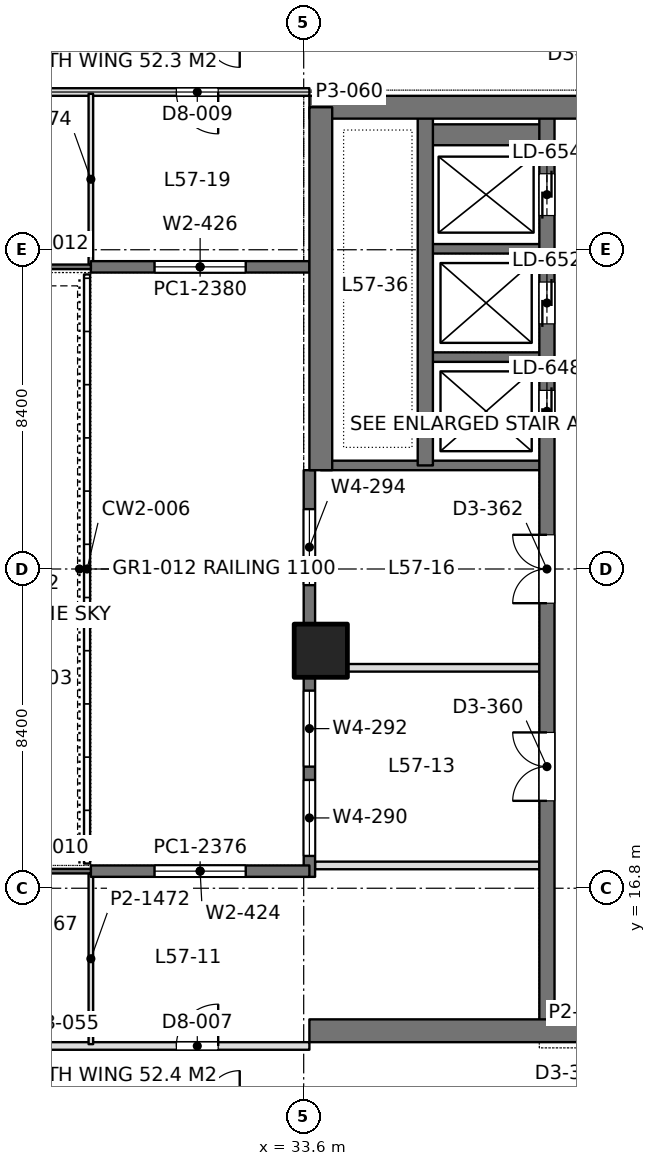
"""IFC4 building model, lengths in metres.
Left out: names, types, materials, properties, quantities, classifications, styles, units other than length and angle.
Written with IfcOpenShell. Run it as: python <this file> out.ifc"""

import sys

from ifc_helpers import new_model, si_unit, direction, frame, frame_2d, origin, origin_2d, place, context, subcontext, project, spatial, rectangle, extrude, element, fill, save


model = new_model("IFC4")
c1 = context("Model", 3, precision=1e-05, world=origin(), true_north=direction((0.0, 1.0)))
c2 = subcontext(c1, "Body", "Model", "MODEL_VIEW")
j1 = project(units=[si_unit("LENGTHUNIT", "METRE"), si_unit("PLANEANGLEUNIT", "RADIAN")], contexts=[c1])
p1 = place(None, origin())
s1 = spatial("IfcSite", under=j1, at=p1, CompositionType="ELEMENT")
p2 = place(p1, origin())
s2 = spatial("IfcBuilding", under=s1, at=p2, CompositionType="ELEMENT")
p3 = place(p2, frame((0.0, 0.0, 250.2)))
s3 = spatial("IfcBuildingStorey", under=s2, at=p3, CompositionType="ELEMENT", Elevation=250.2)
p4 = place(p3, frame((34.05, 23.05, 0.0), z_axis=(0.0, 0.0, 1.0), x_axis=(1.0, 0.0, 0.0)))
e1 = element("IfcColumn", 1, at=p4, inside=s3, PredefinedType="COLUMN", context=c2, shape_type="SweptSolid", body=[
    extrude(rectangle(XDim=1.4, YDim=1.4, at=origin_2d()), origin(), (0.0, 0.0, 1.0), 4.5),
])
p5 = place(p3, frame((33.75, 13.05, 0.0), z_axis=(0.0, 0.0, 1.0), x_axis=(1.0, 0.0, 0.0)))
e2 = element("IfcWall", 2, at=p5, inside=s3, PredefinedType="SHEAR", context=c2, shape_type="SweptSolid", body=[
    extrude(rectangle(XDim=17.7, YDim=0.6, at=frame_2d((8.85, 0.0))), origin(), (0.0, 0.0, 1.0), 4.5),
])
p6 = place(p5, frame((7.1, 0.0, 0.0)))
e3 = element("IfcOpeningElement", 3, at=p6, cuts=e2, PredefinedType="OPENING", context=c2, shape_type="SweptSolid", body=[
    extrude(rectangle(XDim=1.8, YDim=2.4, at=frame_2d((0.9, 1.2))), frame((0.0, 0.31, 0.0), z_axis=(0.0, -1.0, 0.0), x_axis=(1.0, 0.0, 0.0)), (0.0, 0.0, 1.0), 0.62),
])
p7 = place(p3, frame((33.75, 37.35, 0.0), z_axis=(0.0, 0.0, 1.0), x_axis=(1.0, 0.0, 0.0)))
e4 = element("IfcWall", 4, at=p7, inside=s3, PredefinedType="SHEAR", context=c2, shape_type="SweptSolid", body=[
    extrude(rectangle(XDim=17.7, YDim=0.6, at=frame_2d((8.85, 0.0))), origin(), (0.0, 0.0, 1.0), 4.5),
])
p8 = place(p7, frame((7.1, 0.0, 0.0)))
e5 = element("IfcOpeningElement", 5, at=p8, cuts=e4, PredefinedType="OPENING", context=c2, shape_type="SweptSolid", body=[
    extrude(rectangle(XDim=1.8, YDim=2.4, at=frame_2d((0.9, 1.2))), frame((0.0, 0.31, 0.0), z_axis=(0.0, -1.0, 0.0), x_axis=(1.0, 0.0, 0.0)), (0.0, 0.0, 1.0), 0.62),
])
p9 = place(p3, frame((34.05, 27.8, 0.0), z_axis=(0.0, 0.0, 1.0), x_axis=(0.0, 1.0, 0.0)))
e6 = element("IfcWall", 6, at=p9, inside=s3, PredefinedType="SHEAR", context=c2, shape_type="SweptSolid", body=[
    extrude(rectangle(XDim=9.55, YDim=0.6, at=frame_2d((4.775, 0.0))), origin(), (0.0, 0.0, 1.0), 4.5),
])
p10 = place(p3, frame((40.0, 13.05, 0.0), z_axis=(0.0, 0.0, 1.0), x_axis=(0.0, 1.0, 0.0)))
e7 = element("IfcWall", 7, at=p10, inside=s3, PredefinedType="SHEAR", context=c2, shape_type="SweptSolid", body=[
    extrude(rectangle(XDim=24.3, YDim=0.4, at=frame_2d((12.15, 0.0))), origin(), (0.0, 0.0, 1.0), 4.5),
])
p11 = place(p10, frame((15.75, 0.0, 0.0)))
e8 = element("IfcOpeningElement", 8, at=p11, cuts=e7, PredefinedType="OPENING", context=c2, shape_type="SweptSolid", body=[
    extrude(rectangle(XDim=1.1, YDim=2.2, at=frame_2d((0.55, 1.1))), frame((0.0, 0.21, 0.0), z_axis=(0.0, -1.0, 0.0), x_axis=(1.0, 0.0, 0.0)), (0.0, 0.0, 1.0), 0.42),
])
p12 = place(p10, frame((18.6, 0.0, 0.0)))
e9 = element("IfcOpeningElement", 9, at=p12, cuts=e7, PredefinedType="OPENING", context=c2, shape_type="SweptSolid", body=[
    extrude(rectangle(XDim=1.1, YDim=2.2, at=frame_2d((0.55, 1.1))), frame((0.0, 0.21, 0.0), z_axis=(0.0, -1.0, 0.0), x_axis=(1.0, 0.0, 0.0)), (0.0, 0.0, 1.0), 0.42),
])
p13 = place(p10, frame((21.45, 0.0, 0.0)))
e10 = element("IfcOpeningElement", 10, at=p13, cuts=e7, PredefinedType="OPENING", context=c2, shape_type="SweptSolid", body=[
    extrude(rectangle(XDim=1.1, YDim=2.2, at=frame_2d((0.55, 1.1))), frame((0.0, 0.21, 0.0), z_axis=(0.0, -1.0, 0.0), x_axis=(1.0, 0.0, 0.0)), (0.0, 0.0, 1.0), 0.42),
])
p14 = place(p10, frame((6.05, 0.0, 0.0)))
e11 = element("IfcOpeningElement", 11, at=p14, cuts=e7, PredefinedType="OPENING", context=c2, shape_type="SweptSolid", body=[
    extrude(rectangle(XDim=1.8, YDim=2.4, at=frame_2d((0.9, 1.2))), frame((0.0, 0.21, 0.0), z_axis=(0.0, -1.0, 0.0), x_axis=(1.0, 0.0, 0.0)), (0.0, 0.0, 1.0), 0.42),
])
p15 = place(p10, frame((11.25, 0.0, 0.0)))
e12 = element("IfcOpeningElement", 12, at=p15, cuts=e7, PredefinedType="OPENING", context=c2, shape_type="SweptSolid", body=[
    extrude(rectangle(XDim=1.8, YDim=2.4, at=frame_2d((0.9, 1.2))), frame((0.0, 0.21, 0.0), z_axis=(0.0, -1.0, 0.0), x_axis=(1.0, 0.0, 0.0)), (0.0, 0.0, 1.0), 0.42),
])
p16 = place(p3, frame((36.8, 27.925, 0.0), z_axis=(0.0, 0.0, 1.0), x_axis=(0.0, 1.0, 0.0)))
e13 = element("IfcWall", 13, at=p16, inside=s3, PredefinedType="SHEAR", context=c2, shape_type="SweptSolid", body=[
    extrude(rectangle(XDim=9.425, YDim=0.4, at=frame_2d((4.712, 0.0))), origin(), (0.0, 0.0, 1.0), 4.5),
])
p17 = place(p3, frame((40.0, 27.925, 0.0), z_axis=(0.0, 0.0, 1.0), x_axis=(-1.0, 0.0, 0.0)))
e14 = element("IfcWall", 14, at=p17, inside=s3, PredefinedType="SHEAR", context=c2, shape_type="SweptSolid", body=[
    extrude(rectangle(XDim=5.95, YDim=0.25, at=frame_2d((2.975, 0.0))), origin(), (0.0, 0.0, 1.0), 4.5),
])
for number, where, z_axis, x_axis in (
    (15, (40.0, 30.775, 0.0), (0.0, 0.0, 1.0), (-1.0, 0.0, 0.0)),
    (16, (40.0, 33.625, 0.0), (0.0, 0.0, 1.0), (-1.0, 0.0, 0.0)),
):
    element("IfcWall", number, at=place(p3, frame(where, z_axis=z_axis, x_axis=x_axis)), inside=s3, PredefinedType="SHEAR", context=c2, shape_type="SweptSolid", body=[
        extrude(rectangle(XDim=3.2, YDim=0.25, at=frame_2d((1.6, 0.0))), origin(), (0.0, 0.0, 1.0), 4.5),
    ])
p18 = place(p3, frame((40.0, 36.625, 0.0), z_axis=(0.0, 0.0, 1.0), x_axis=(-1.0, 0.0, 0.0)))
e17 = element("IfcWall", 17, at=p18, inside=s3, PredefinedType="SHEAR", context=c2, shape_type="SweptSolid", body=[
    extrude(rectangle(XDim=3.2, YDim=0.55, at=frame_2d((1.6, 0.0))), origin(), (0.0, 0.0, 1.0), 4.5),
])
p19 = place(p3, frame((33.75, 17.1, 0.0), z_axis=(0.0, 0.0, 1.0), x_axis=(0.0, 1.0, 0.0)))
e18 = element("IfcWall", 18, at=p19, inside=s3, PredefinedType="SOLIDWALL", context=c2, shape_type="SweptSolid", body=[
    extrude(rectangle(XDim=10.7, YDim=0.3, at=frame_2d((5.35, 0.0))), origin(), (0.0, 0.0, 1.0), 4.35),
])
p20 = place(p19, frame((0.55, 0.0, 0.9)))
e19 = element("IfcOpeningElement", 19, at=p20, cuts=e18, PredefinedType="OPENING", context=c2, shape_type="SweptSolid", body=[
    extrude(rectangle(XDim=2.0, YDim=1.9, at=frame_2d((1.0, 0.95))), frame((0.0, 0.16, 0.0), z_axis=(0.0, -1.0, 0.0), x_axis=(1.0, 0.0, 0.0)), (0.0, 0.0, 1.0), 0.32),
])
p21 = place(p19, frame((2.9, 0.0, 0.9)))
e20 = element("IfcOpeningElement", 20, at=p21, cuts=e18, PredefinedType="OPENING", context=c2, shape_type="SweptSolid", body=[
    extrude(rectangle(XDim=2.0, YDim=1.9, at=frame_2d((1.0, 0.95))), frame((0.0, 0.16, 0.0), z_axis=(0.0, -1.0, 0.0), x_axis=(1.0, 0.0, 0.0)), (0.0, 0.0, 1.0), 0.32),
])
p22 = place(p19, frame((7.675, 0.0, 0.9)))
e21 = element("IfcOpeningElement", 21, at=p22, cuts=e18, PredefinedType="OPENING", context=c2, shape_type="SweptSolid", body=[
    extrude(rectangle(XDim=2.0, YDim=1.9, at=frame_2d((1.0, 0.95))), frame((0.0, 0.16, 0.0), z_axis=(0.0, -1.0, 0.0), x_axis=(1.0, 0.0, 0.0)), (0.0, 0.0, 1.0), 0.32),
])
p23 = place(p3, frame((25.7, 17.25, 0.0), z_axis=(0.0, 0.0, 1.0), x_axis=(1.0, 0.0, 0.0)))
e22 = element("IfcWall", 22, at=p23, inside=s3, PredefinedType="SOLIDWALL", context=c2, shape_type="SweptSolid", body=[
    extrude(rectangle(XDim=2.3, YDim=0.12, at=frame_2d((1.15, 0.0))), origin(), (0.0, 0.0, 1.0), 4.35),
])
p24 = place(p3, frame((28.0, 17.25, 0.0), z_axis=(0.0, 0.0, 1.0), x_axis=(1.0, 0.0, 0.0)))
e23 = element("IfcWall", 23, at=p24, inside=s3, PredefinedType="SOLIDWALL", context=c2, shape_type="SweptSolid", body=[
    extrude(rectangle(XDim=5.75, YDim=0.3, at=frame_2d((2.875, 0.0))), origin(), (0.0, 0.0, 1.0), 4.35),
])
p25 = place(p24, frame((1.675, 0.0, 0.9)))
e24 = element("IfcOpeningElement", 24, at=p25, cuts=e23, PredefinedType="OPENING", context=c2, shape_type="SweptSolid", body=[
    extrude(rectangle(XDim=2.4, YDim=1.9, at=frame_2d((1.2, 0.95))), frame((0.0, 0.16, 0.0), z_axis=(0.0, -1.0, 0.0), x_axis=(1.0, 0.0, 0.0)), (0.0, 0.0, 1.0), 0.32),
])
p26 = place(p3, frame((25.7, 33.15, 0.0), z_axis=(0.0, 0.0, 1.0), x_axis=(1.0, 0.0, 0.0)))
e25 = element("IfcWall", 25, at=p26, inside=s3, PredefinedType="SOLIDWALL", context=c2, shape_type="SweptSolid", body=[
    extrude(rectangle(XDim=2.3, YDim=0.12, at=frame_2d((1.15, 0.0))), origin(), (0.0, 0.0, 1.0), 4.35),
])
p27 = place(p3, frame((28.0, 33.15, 0.0), z_axis=(0.0, 0.0, 1.0), x_axis=(1.0, 0.0, 0.0)))
e26 = element("IfcWall", 26, at=p27, inside=s3, PredefinedType="SOLIDWALL", context=c2, shape_type="SweptSolid", body=[
    extrude(rectangle(XDim=5.75, YDim=0.3, at=frame_2d((2.875, 0.0))), origin(), (0.0, 0.0, 1.0), 4.35),
])
p28 = place(p27, frame((1.675, 0.0, 0.9)))
e27 = element("IfcOpeningElement", 27, at=p28, cuts=e26, PredefinedType="OPENING", context=c2, shape_type="SweptSolid", body=[
    extrude(rectangle(XDim=2.4, YDim=1.9, at=frame_2d((1.2, 0.95))), frame((0.0, 0.16, 0.0), z_axis=(0.0, -1.0, 0.0), x_axis=(1.0, 0.0, 0.0)), (0.0, 0.0, 1.0), 0.32),
])
p29 = place(p3, frame((33.898, 17.4, 0.0), z_axis=(0.0, 0.0, 1.0), x_axis=(1.0, 0.0, 0.0)))
e28 = element("IfcWall", 28, at=p29, inside=s3, PredefinedType="PARTITIONING", context=c2, shape_type="SweptSolid", body=[
    extrude(rectangle(XDim=5.904, YDim=0.2, at=frame_2d((2.952, 0.0))), origin(), (0.0, 0.0, 1.0), 3.8),
])
p30 = place(p3, frame((34.749, 22.6, 0.0), z_axis=(0.0, 0.0, 1.0), x_axis=(1.0, 0.0, 0.0)))
e29 = element("IfcWall", 29, at=p30, inside=s3, PredefinedType="PARTITIONING", context=c2, shape_type="SweptSolid", body=[
    extrude(rectangle(XDim=5.053, YDim=0.2, at=frame_2d((2.526, 0.0))), origin(), (0.0, 0.0, 1.0), 4.35),
])
p31 = place(p3, frame((16.65, 12.65, 0.0), z_axis=(0.0, 0.0, 1.0), x_axis=(1.0, 0.0, 0.0)))
e30 = element("IfcWall", 30, at=p31, inside=s3, PredefinedType="PARTITIONING", context=c2, shape_type="SweptSolid", body=[
    extrude(rectangle(XDim=17.1, YDim=0.2, at=frame_2d((8.55, 0.0))), origin(), (0.0, 0.0, 1.0), 3.8),
])
p32 = place(p31, frame((2.4, 0.0, 0.0)))
e31 = element("IfcOpeningElement", 31, at=p32, cuts=e30, PredefinedType="OPENING", context=c2, shape_type="SweptSolid", body=[
    extrude(rectangle(XDim=1.1, YDim=2.4, at=frame_2d((0.55, 1.2))), frame((0.0, 0.11, 0.0), z_axis=(0.0, -1.0, 0.0), x_axis=(1.0, 0.0, 0.0)), (0.0, 0.0, 1.0), 0.22),
])
p33 = place(p31, frame((7.65, 0.0, 0.0)))
e32 = element("IfcOpeningElement", 32, at=p33, cuts=e30, PredefinedType="OPENING", context=c2, shape_type="SweptSolid", body=[
    extrude(rectangle(XDim=1.8, YDim=2.2, at=frame_2d((0.9, 1.1))), frame((0.0, 0.11, 0.0), z_axis=(0.0, -1.0, 0.0), x_axis=(1.0, 0.0, 0.0)), (0.0, 0.0, 1.0), 0.22),
])
p34 = place(p31, frame((13.6, 0.0, 0.0)))
e33 = element("IfcOpeningElement", 33, at=p34, cuts=e30, PredefinedType="OPENING", context=c2, shape_type="SweptSolid", body=[
    extrude(rectangle(XDim=1.1, YDim=2.4, at=frame_2d((0.55, 1.2))), frame((0.0, 0.11, 0.0), z_axis=(0.0, -1.0, 0.0), x_axis=(1.0, 0.0, 0.0)), (0.0, 0.0, 1.0), 0.22),
])
p35 = place(p3, frame((28.0, 12.698, 0.0), z_axis=(0.0, 0.0, 1.0), x_axis=(0.0, 1.0, 0.0)))
e34 = element("IfcWall", 34, at=p35, inside=s3, PredefinedType="PARTITIONING", context=c2, shape_type="SweptSolid", body=[
    extrude(rectangle(XDim=4.494, YDim=0.12, at=frame_2d((2.247, 0.0))), origin(), (0.0, 0.0, 1.0), 3.5),
])
p36 = place(p3, frame((16.65, 37.75, 0.0), z_axis=(0.0, 0.0, 1.0), x_axis=(1.0, 0.0, 0.0)))
e35 = element("IfcWall", 35, at=p36, inside=s3, PredefinedType="PARTITIONING", context=c2, shape_type="SweptSolid", body=[
    extrude(rectangle(XDim=17.1, YDim=0.2, at=frame_2d((8.55, 0.0))), origin(), (0.0, 0.0, 1.0), 3.8),
])
p37 = place(p36, frame((2.4, 0.0, 0.0)))
e36 = element("IfcOpeningElement", 36, at=p37, cuts=e35, PredefinedType="OPENING", context=c2, shape_type="SweptSolid", body=[
    extrude(rectangle(XDim=1.1, YDim=2.4, at=frame_2d((0.55, 1.2))), frame((0.0, 0.11, 0.0), z_axis=(0.0, -1.0, 0.0), x_axis=(1.0, 0.0, 0.0)), (0.0, 0.0, 1.0), 0.22),
])
p38 = place(p36, frame((7.65, 0.0, 0.0)))
e37 = element("IfcOpeningElement", 37, at=p38, cuts=e35, PredefinedType="OPENING", context=c2, shape_type="SweptSolid", body=[
    extrude(rectangle(XDim=1.8, YDim=2.2, at=frame_2d((0.9, 1.1))), frame((0.0, 0.11, 0.0), z_axis=(0.0, -1.0, 0.0), x_axis=(1.0, 0.0, 0.0)), (0.0, 0.0, 1.0), 0.22),
])
p39 = place(p36, frame((13.6, 0.0, 0.0)))
e38 = element("IfcOpeningElement", 38, at=p39, cuts=e35, PredefinedType="OPENING", context=c2, shape_type="SweptSolid", body=[
    extrude(rectangle(XDim=1.1, YDim=2.4, at=frame_2d((0.55, 1.2))), frame((0.0, 0.11, 0.0), z_axis=(0.0, -1.0, 0.0), x_axis=(1.0, 0.0, 0.0)), (0.0, 0.0, 1.0), 0.22),
])
p40 = place(p3, frame((28.0, 33.208, 0.0), z_axis=(0.0, 0.0, 1.0), x_axis=(0.0, 1.0, 0.0)))
e39 = element("IfcWall", 39, at=p40, inside=s3, PredefinedType="PARTITIONING", context=c2, shape_type="SweptSolid", body=[
    extrude(rectangle(XDim=4.494, YDim=0.12, at=frame_2d((2.247, 0.0))), origin(), (0.0, 0.0, 1.0), 3.5),
])
p41 = place(p20, origin())
e40 = element("IfcWindow", 40, at=p41, inside=s3, PartitioningType="SINGLE_PANEL", PredefinedType="WINDOW", context=c2, shape_type="SweptSolid", body=[
    extrude(rectangle(XDim=2.0, YDim=1.9, at=frame_2d((1.0, 0.95))), frame((0.0, 0.03, 0.0), z_axis=(0.0, -1.0, 0.0), x_axis=(1.0, 0.0, 0.0)), (0.0, 0.0, 1.0), 0.06),
])
fill(e19, e40)
p42 = place(p21, origin())
e41 = element("IfcWindow", 41, at=p42, inside=s3, PartitioningType="SINGLE_PANEL", PredefinedType="WINDOW", context=c2, shape_type="SweptSolid", body=[
    extrude(rectangle(XDim=2.0, YDim=1.9, at=frame_2d((1.0, 0.95))), frame((0.0, 0.03, 0.0), z_axis=(0.0, -1.0, 0.0), x_axis=(1.0, 0.0, 0.0)), (0.0, 0.0, 1.0), 0.06),
])
fill(e20, e41)
p43 = place(p22, origin())
e42 = element("IfcWindow", 42, at=p43, inside=s3, PartitioningType="SINGLE_PANEL", PredefinedType="WINDOW", context=c2, shape_type="SweptSolid", body=[
    extrude(rectangle(XDim=2.0, YDim=1.9, at=frame_2d((1.0, 0.95))), frame((0.0, 0.03, 0.0), z_axis=(0.0, -1.0, 0.0), x_axis=(1.0, 0.0, 0.0)), (0.0, 0.0, 1.0), 0.06),
])
fill(e21, e42)
p44 = place(p25, origin())
e43 = element("IfcWindow", 43, at=p44, inside=s3, PartitioningType="SINGLE_PANEL", PredefinedType="WINDOW", context=c2, shape_type="SweptSolid", body=[
    extrude(rectangle(XDim=2.4, YDim=1.9, at=frame_2d((1.2, 0.95))), frame((0.0, 0.03, 0.0), z_axis=(0.0, -1.0, 0.0), x_axis=(1.0, 0.0, 0.0)), (0.0, 0.0, 1.0), 0.06),
])
fill(e24, e43)
p45 = place(p28, origin())
e44 = element("IfcWindow", 44, at=p45, inside=s3, PartitioningType="SINGLE_PANEL", PredefinedType="WINDOW", context=c2, shape_type="SweptSolid", body=[
    extrude(rectangle(XDim=2.4, YDim=1.9, at=frame_2d((1.2, 0.95))), frame((0.0, 0.03, 0.0), z_axis=(0.0, -1.0, 0.0), x_axis=(1.0, 0.0, 0.0)), (0.0, 0.0, 1.0), 0.06),
])
fill(e27, e44)
p46 = place(p11, origin())
e45 = element("IfcDoor", 45, at=p46, inside=s3, OperationType="DOUBLE_DOOR_SLIDING", PredefinedType="DOOR", context=c2, shape_type="SweptSolid", body=[
    extrude(rectangle(XDim=1.1, YDim=2.2, at=frame_2d((0.55, 1.1))), frame((0.0, 0.025, 0.0), z_axis=(0.0, -1.0, 0.0), x_axis=(1.0, 0.0, 0.0)), (0.0, 0.0, 1.0), 0.05),
])
fill(e8, e45)
p47 = place(p12, origin())
e46 = element("IfcDoor", 46, at=p47, inside=s3, OperationType="DOUBLE_DOOR_SLIDING", PredefinedType="DOOR", context=c2, shape_type="SweptSolid", body=[
    extrude(rectangle(XDim=1.1, YDim=2.2, at=frame_2d((0.55, 1.1))), frame((0.0, 0.025, 0.0), z_axis=(0.0, -1.0, 0.0), x_axis=(1.0, 0.0, 0.0)), (0.0, 0.0, 1.0), 0.05),
])
fill(e9, e46)
p48 = place(p13, origin())
e47 = element("IfcDoor", 47, at=p48, inside=s3, OperationType="DOUBLE_DOOR_SLIDING", PredefinedType="DOOR", context=c2, shape_type="SweptSolid", body=[
    extrude(rectangle(XDim=1.1, YDim=2.2, at=frame_2d((0.55, 1.1))), frame((0.0, 0.025, 0.0), z_axis=(0.0, -1.0, 0.0), x_axis=(1.0, 0.0, 0.0)), (0.0, 0.0, 1.0), 0.05),
])
fill(e10, e47)
p49 = place(p14, origin())
e48 = element("IfcDoor", 48, at=p49, inside=s3, OperationType="DOUBLE_DOOR_SINGLE_SWING", PredefinedType="DOOR", context=c2, shape_type="SweptSolid", body=[
    extrude(rectangle(XDim=1.8, YDim=2.4, at=frame_2d((0.9, 1.2))), frame((0.0, 0.025, 0.0), z_axis=(0.0, -1.0, 0.0), x_axis=(1.0, 0.0, 0.0)), (0.0, 0.0, 1.0), 0.05),
])
fill(e11, e48)
p50 = place(p15, origin())
e49 = element("IfcDoor", 49, at=p50, inside=s3, OperationType="DOUBLE_DOOR_SINGLE_SWING", PredefinedType="DOOR", context=c2, shape_type="SweptSolid", body=[
    extrude(rectangle(XDim=1.8, YDim=2.4, at=frame_2d((0.9, 1.2))), frame((0.0, 0.025, 0.0), z_axis=(0.0, -1.0, 0.0), x_axis=(1.0, 0.0, 0.0)), (0.0, 0.0, 1.0), 0.05),
])
fill(e12, e49)
p51 = place(p34, origin())
e50 = element("IfcDoor", 50, at=p51, inside=s3, OperationType="SINGLE_SWING_RIGHT", PredefinedType="DOOR", context=c2, shape_type="SweptSolid", body=[
    extrude(rectangle(XDim=1.1, YDim=2.4, at=frame_2d((0.55, 1.2))), frame((0.0, 0.025, 0.0), z_axis=(0.0, -1.0, 0.0), x_axis=(1.0, 0.0, 0.0)), (0.0, 0.0, 1.0), 0.05),
])
fill(e33, e50)
p52 = place(p39, frame((1.1, 0.0, 0.0), z_axis=(0.0, 0.0, 1.0), x_axis=(-1.0, 0.0, 0.0)))
e51 = element("IfcDoor", 51, at=p52, inside=s3, OperationType="SINGLE_SWING_LEFT", PredefinedType="DOOR", context=c2, shape_type="SweptSolid", body=[
    extrude(rectangle(XDim=1.1, YDim=2.4, at=frame_2d((0.55, 1.2))), frame((0.0, 0.025, 0.0), z_axis=(0.0, -1.0, 0.0), x_axis=(1.0, 0.0, 0.0)), (0.0, 0.0, 1.0), 0.05),
])
fill(e38, e51)
save(model, sys.argv[1])
